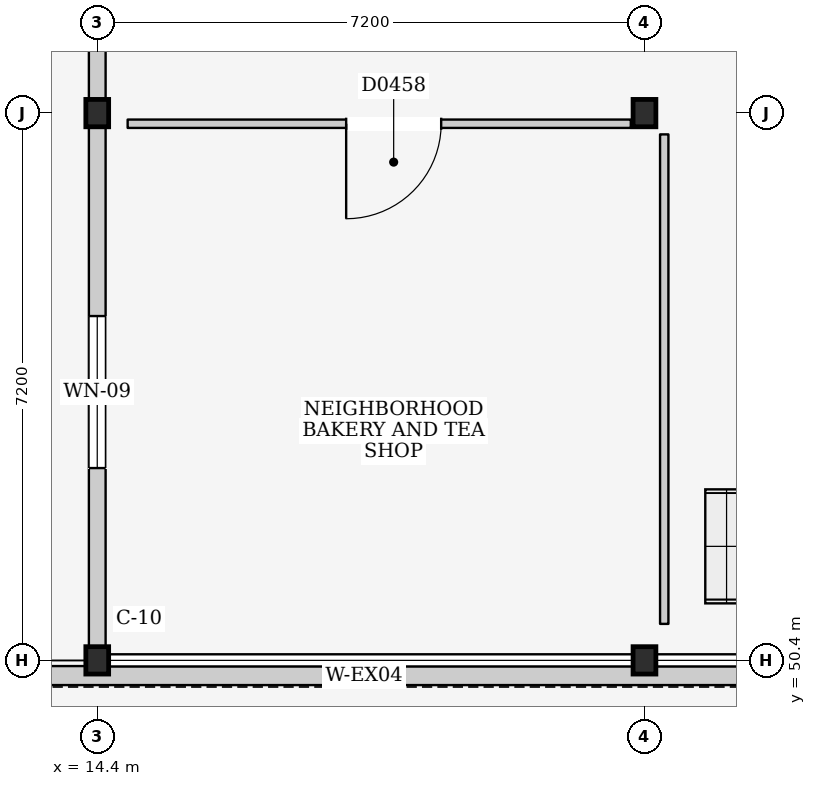
"""IFC4 building model, lengths in metres.
Left out: names, types, materials, properties, quantities, classifications, styles, units other than length and angle.
Written with IfcOpenShell. Run it as: python <this file> out.ifc"""

import sys

from ifc_helpers import new_model, si_unit, direction, frame, frame_2d, origin, origin_2d, place, context, subcontext, project, spatial, rectangle, i_section, extrude, element, fill, save


model = new_model("IFC4")
c1 = context("Model", 3, precision=1e-05, world=origin(), true_north=direction((0.0, 1.0)))
c2 = subcontext(c1, "Body", "Model", "MODEL_VIEW")
j1 = project(units=[si_unit("LENGTHUNIT", "METRE"), si_unit("PLANEANGLEUNIT", "RADIAN")], contexts=[c1])
p1 = place(None, origin())
s1 = spatial("IfcSite", under=j1, at=p1, CompositionType="ELEMENT")
p2 = place(p1, origin())
s2 = spatial("IfcBuilding", under=s1, at=p2, CompositionType="ELEMENT")
p3 = place(p2, origin())
s3 = spatial("IfcBuildingStorey", under=s2, at=p3, CompositionType="ELEMENT", Elevation=0.0)
for number, where, z_axis, x_axis in (
    (1, (14.4, 50.4, 0.0), (0.0, 0.0, 1.0), (1.0, 0.0, 0.0)),
    (2, (14.4, 57.6, 0.0), (0.0, 0.0, 1.0), (1.0, 0.0, 0.0)),
    (3, (21.6, 50.4, 0.0), (0.0, 0.0, 1.0), (1.0, 0.0, 0.0)),
    (4, (21.6, 57.6, 0.0), (0.0, 0.0, 1.0), (1.0, 0.0, 0.0)),
):
    element("IfcColumn", number, at=place(p3, frame(where, z_axis=z_axis, x_axis=x_axis)), inside=s3, PredefinedType="COLUMN", context=c2, shape_type="SweptSolid", body=[
        extrude(i_section(OverallWidth=0.3, OverallDepth=0.36, WebThickness=0.012, FlangeThickness=0.022, at=origin_2d()), origin(), (0.0, 0.0, 1.0), 4.5),
    ])
p4 = place(p3, frame((0.14, 50.2, 0.0), z_axis=(0.0, 0.0, 1.0), x_axis=(1.0, 0.0, 0.0)))
e5 = element("IfcWall", 5, at=p4, inside=s3, PredefinedType="SOLIDWALL", context=c2, shape_type="SweptSolid", body=[
    extrude(rectangle(XDim=35.54, YDim=0.25, at=frame_2d((17.77, 0.0))), origin(), (0.0, 0.0, 1.0), 3.585),
])
p5 = place(p3, frame((14.4, 50.58, 0.0), z_axis=(0.0, 0.0, 1.0), x_axis=(0.0, 1.0, 0.0)))
e6 = element("IfcWall", 6, at=p5, inside=s3, PredefinedType="ELEMENTEDWALL", context=c2, shape_type="SweptSolid", body=[
    extrude(rectangle(XDim=6.84, YDim=0.22, at=frame_2d((3.42, 0.0))), origin(), (0.0, 0.0, 1.0), 3.585),
])
p6 = place(p5, frame((2.35, 0.0, 0.95)))
e7 = element("IfcOpeningElement", 7, at=p6, cuts=e6, PredefinedType="OPENING", context=c2, shape_type="SweptSolid", body=[
    extrude(rectangle(XDim=2.0, YDim=1.5, at=frame_2d((1.0, 0.75))), frame((0.0, 0.125, 0.0), z_axis=(0.0, -1.0, 0.0), x_axis=(1.0, 0.0, 0.0)), (0.0, 0.0, 1.0), 0.25),
])
p7 = place(p3, frame((14.4, 57.78, 0.0), z_axis=(0.0, 0.0, 1.0), x_axis=(0.0, 1.0, 0.0)))
e8 = element("IfcWall", 8, at=p7, inside=s3, PredefinedType="ELEMENTEDWALL", context=c2, shape_type="SweptSolid", body=[
    extrude(rectangle(XDim=6.84, YDim=0.22, at=frame_2d((3.42, 0.0))), origin(), (0.0, 0.0, 1.0), 3.585),
])
p8 = place(p7, frame((2.35, 0.0, 0.95)))
e9 = element("IfcOpeningElement", 9, at=p8, cuts=e8, PredefinedType="OPENING", context=c2, shape_type="SweptSolid", body=[
    extrude(rectangle(XDim=2.0, YDim=1.5, at=frame_2d((1.0, 0.75))), frame((0.0, 0.125, 0.0), z_axis=(0.0, -1.0, 0.0), x_axis=(1.0, 0.0, 0.0)), (0.0, 0.0, 1.0), 0.25),
])
p9 = place(p3, frame((14.8, 57.46, 0.0), z_axis=(0.0, 0.0, 1.0), x_axis=(1.0, 0.0, 0.0)))
e10 = element("IfcWall", 10, at=p9, inside=s3, PredefinedType="PARTITIONING", context=c2, shape_type="SweptSolid", body=[
    extrude(rectangle(XDim=6.62, YDim=0.11, at=frame_2d((3.31, 0.0))), origin(), (0.0, 0.0, 1.0), 3.585),
])
p10 = place(p9, frame((2.875, 0.0, 0.0)))
e11 = element("IfcOpeningElement", 11, at=p10, cuts=e10, PredefinedType="OPENING", context=c2, shape_type="SweptSolid", body=[
    extrude(rectangle(XDim=1.25, YDim=2.25, at=frame_2d((0.625, 1.125))), frame((0.0, 0.07, 0.0), z_axis=(0.0, -1.0, 0.0), x_axis=(1.0, 0.0, 0.0)), (0.0, 0.0, 1.0), 0.14),
])
p11 = place(p3, frame((21.86, 50.88, 0.0), z_axis=(0.0, 0.0, 1.0), x_axis=(0.0, 1.0, 0.0)))
e12 = element("IfcWall", 12, at=p11, inside=s3, PredefinedType="PARTITIONING", context=c2, shape_type="SweptSolid", body=[
    extrude(rectangle(XDim=6.44, YDim=0.11, at=frame_2d((3.22, 0.0))), origin(), (0.0, 0.0, 1.0), 4.2),
])
p12 = place(p6, origin())
e13 = element("IfcWindow", 13, at=p12, inside=s3, PartitioningType="DOUBLE_PANEL_VERTICAL", PredefinedType="WINDOW", context=c2, shape_type="SweptSolid", body=[
    extrude(rectangle(XDim=2.0, YDim=1.5, at=frame_2d((1.0, 0.75))), frame((0.0, 0.03, 0.0), z_axis=(0.0, -1.0, 0.0), x_axis=(1.0, 0.0, 0.0)), (0.0, 0.0, 1.0), 0.06),
])
fill(e7, e13)
p13 = place(p10, frame((1.25, 0.0, 0.0), z_axis=(0.0, 0.0, 1.0), x_axis=(-1.0, 0.0, 0.0)))
e14 = element("IfcDoor", 14, at=p13, inside=s3, OperationType="SINGLE_SWING_RIGHT", PredefinedType="DOOR", context=c2, shape_type="SweptSolid", body=[
    extrude(rectangle(XDim=1.25, YDim=2.25, at=frame_2d((0.625, 1.125))), frame((0.0, 0.025, 0.0), z_axis=(0.0, -1.0, 0.0), x_axis=(1.0, 0.0, 0.0)), (0.0, 0.0, 1.0), 0.05),
])
fill(e11, e14)
save(model, sys.argv[1])
